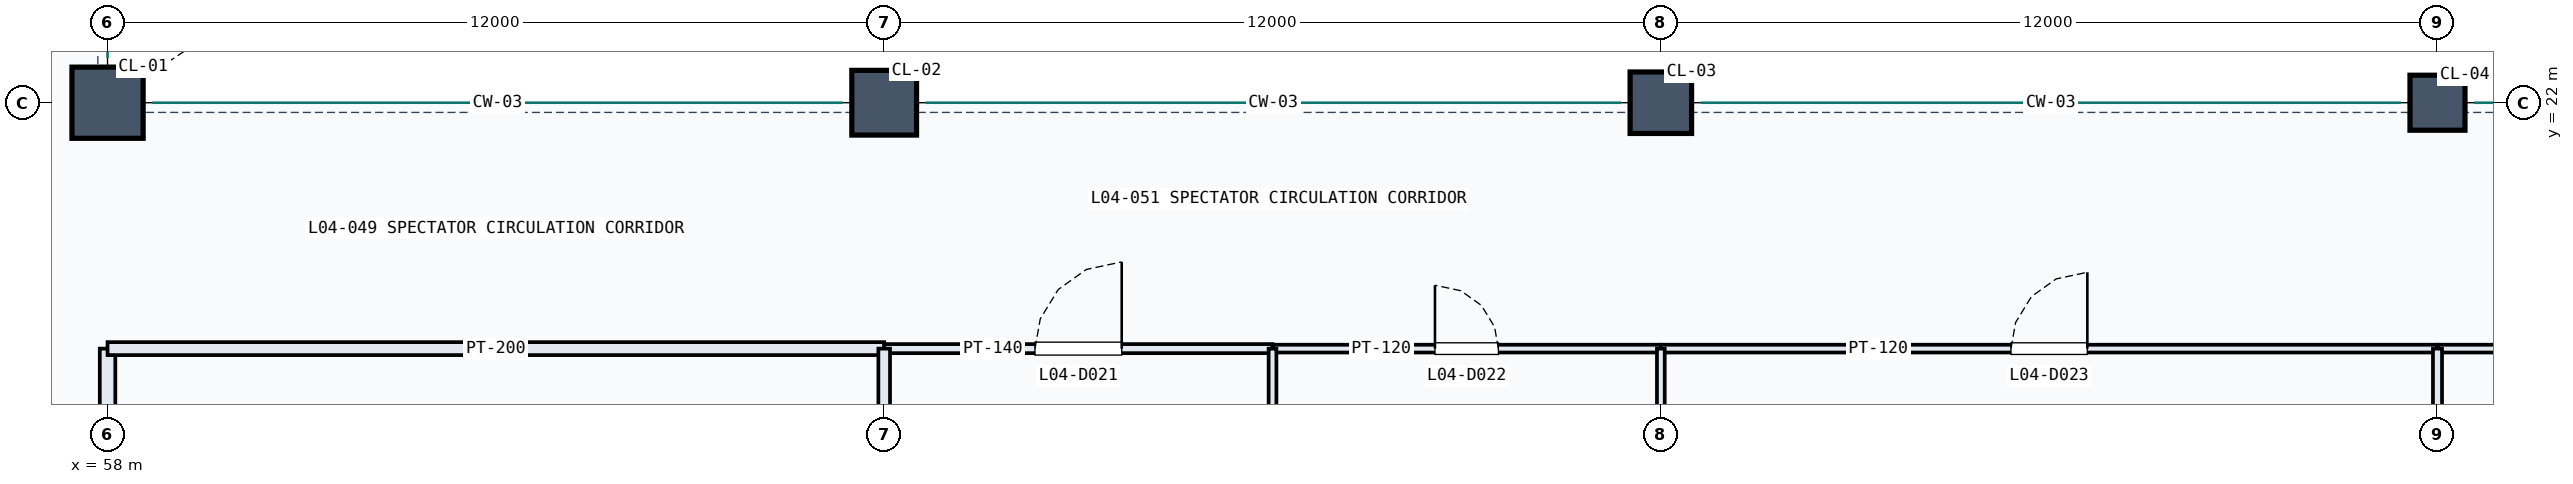
"""IFC4 building model, lengths in metres.
Left out: names, types, materials, properties, quantities, classifications, styles, units other than length and angle.
Written with IfcOpenShell. Run it as: python <this file> out.ifc"""

import sys

from ifc_helpers import new_model, si_unit, direction, frame, frame_2d, origin, origin_2d, place, context, subcontext, project, spatial, rectangle, extrude, element, fill, save


model = new_model("IFC4")
c1 = context("Model", 3, precision=1e-05, world=origin(), true_north=direction((0.0, 1.0)))
c2 = subcontext(c1, "Body", "Model", "MODEL_VIEW")
j1 = project(units=[si_unit("LENGTHUNIT", "METRE"), si_unit("PLANEANGLEUNIT", "RADIAN")], contexts=[c1])
p1 = place(None, origin())
s1 = spatial("IfcSite", under=j1, at=p1, CompositionType="ELEMENT")
p2 = place(p1, origin())
s2 = spatial("IfcBuilding", under=s1, at=p2, CompositionType="ELEMENT")
p3 = place(p2, frame((0.0, 0.0, 19.5)))
s3 = spatial("IfcBuildingStorey", under=s2, at=p3, CompositionType="ELEMENT", Elevation=19.5)
p4 = place(p3, frame((58.0, 22.0, 0.0), z_axis=(0.0, 0.0, 1.0), x_axis=(1.0, 0.0, 0.0)))
e1 = element("IfcColumn", 1, at=p4, inside=s3, PredefinedType="COLUMN", context=c2, shape_type="SweptSolid", body=[
    extrude(rectangle(XDim=1.1, YDim=1.1, at=origin_2d()), origin(), (0.0, 0.0, 1.0), 4.8),
])
p5 = place(p3, frame((70.0, 22.0, 0.0), z_axis=(0.0, 0.0, 1.0), x_axis=(1.0, 0.0, 0.0)))
e2 = element("IfcColumn", 2, at=p5, inside=s3, PredefinedType="COLUMN", context=c2, shape_type="SweptSolid", body=[
    extrude(rectangle(XDim=1.0, YDim=1.0, at=origin_2d()), origin(), (0.0, 0.0, 1.0), 4.8),
])
p6 = place(p3, frame((82.0, 22.0, 0.0), z_axis=(0.0, 0.0, 1.0), x_axis=(1.0, 0.0, 0.0)))
e3 = element("IfcColumn", 3, at=p6, inside=s3, PredefinedType="COLUMN", context=c2, shape_type="SweptSolid", body=[
    extrude(rectangle(XDim=0.95, YDim=0.95, at=origin_2d()), origin(), (0.0, 0.0, 1.0), 4.8),
])
p7 = place(p3, frame((94.0, 22.0, 0.0), z_axis=(0.0, 0.0, 1.0), x_axis=(1.0, 0.0, 0.0)))
e4 = element("IfcColumn", 4, at=p7, inside=s3, PredefinedType="COLUMN", context=c2, shape_type="SweptSolid", body=[
    extrude(rectangle(XDim=0.85, YDim=0.85, at=origin_2d()), origin(), (0.0, 0.0, 1.0), 4.8),
])
p8 = place(p3, frame((58.0, 11.22, 0.0), z_axis=(0.0, 0.0, 1.0), x_axis=(0.0, 1.0, 0.0)))
e5 = element("IfcWall", 5, at=p8, inside=s3, PredefinedType="PARTITIONING", context=c2, shape_type="SweptSolid", body=[
    extrude(rectangle(XDim=6.98, YDim=0.24, at=frame_2d((3.49, 0.0))), origin(), (0.0, 0.0, 1.0), 3.79),
])
p9 = place(p8, frame((2.78, 0.0, 0.0)))
e6 = element("IfcOpeningElement", 6, at=p9, cuts=e5, PredefinedType="OPENING", context=c2, shape_type="SweptSolid", body=[
    extrude(rectangle(XDim=1.42, YDim=2.25, at=frame_2d((0.71, 1.125))), frame((0.0, 0.13, 0.0), z_axis=(0.0, -1.0, 0.0), x_axis=(1.0, 0.0, 0.0)), (0.0, 0.0, 1.0), 0.26),
])
p10 = place(p3, frame((58.0, 18.2, 0.0), z_axis=(0.0, 0.0, 1.0), x_axis=(1.0, 0.0, 0.0)))
e7 = element("IfcWall", 7, at=p10, inside=s3, PredefinedType="PARTITIONING", context=c2, shape_type="SweptSolid", body=[
    extrude(rectangle(XDim=12.0, YDim=0.2, at=frame_2d((6.0, 0.0))), origin(), (0.0, 0.0, 1.0), 3.49),
])
p11 = place(p3, frame((70.0, 18.2, 0.0), z_axis=(0.0, 0.0, 1.0), x_axis=(1.0, 0.0, 0.0)))
e8 = element("IfcWall", 8, at=p11, inside=s3, PredefinedType="PARTITIONING", context=c2, shape_type="SweptSolid", body=[
    extrude(rectangle(XDim=6.0, YDim=0.14, at=frame_2d((3.0, 0.0))), origin(), (0.0, 0.0, 1.0), 3.49),
])
p12 = place(p11, frame((2.33, 0.0, 0.0)))
e9 = element("IfcOpeningElement", 9, at=p12, cuts=e8, PredefinedType="OPENING", context=c2, shape_type="SweptSolid", body=[
    extrude(rectangle(XDim=1.34, YDim=2.15, at=frame_2d((0.67, 1.075))), frame((0.0, 0.08, 0.0), z_axis=(0.0, -1.0, 0.0), x_axis=(1.0, 0.0, 0.0)), (0.0, 0.0, 1.0), 0.16),
])
p13 = place(p3, frame((76.0, 18.2, 0.0), z_axis=(0.0, 0.0, 1.0), x_axis=(1.0, 0.0, 0.0)))
e10 = element("IfcWall", 10, at=p13, inside=s3, PredefinedType="PARTITIONING", context=c2, shape_type="SweptSolid", body=[
    extrude(rectangle(XDim=6.0, YDim=0.12, at=frame_2d((3.0, 0.0))), origin(), (0.0, 0.0, 1.0), 3.64),
])
p14 = place(p13, frame((2.51, 0.0, 0.0)))
e11 = element("IfcOpeningElement", 11, at=p14, cuts=e10, PredefinedType="OPENING", context=c2, shape_type="SweptSolid", body=[
    extrude(rectangle(XDim=0.98, YDim=2.1, at=frame_2d((0.49, 1.05))), frame((0.0, 0.07, 0.0), z_axis=(0.0, -1.0, 0.0), x_axis=(1.0, 0.0, 0.0)), (0.0, 0.0, 1.0), 0.14),
])
p15 = place(p3, frame((82.0, 18.2, 0.0), z_axis=(0.0, 0.0, 1.0), x_axis=(1.0, 0.0, 0.0)))
e12 = element("IfcWall", 12, at=p15, inside=s3, PredefinedType="PARTITIONING", context=c2, shape_type="SweptSolid", body=[
    extrude(rectangle(XDim=12.0, YDim=0.12, at=frame_2d((6.0, 0.0))), origin(), (0.0, 0.0, 1.0), 3.64),
])
p16 = place(p15, frame((5.41, 0.0, 0.0)))
e13 = element("IfcOpeningElement", 13, at=p16, cuts=e12, PredefinedType="OPENING", context=c2, shape_type="SweptSolid", body=[
    extrude(rectangle(XDim=1.18, YDim=2.15, at=frame_2d((0.59, 1.075))), frame((0.0, 0.07, 0.0), z_axis=(0.0, -1.0, 0.0), x_axis=(1.0, 0.0, 0.0)), (0.0, 0.0, 1.0), 0.14),
])
p17 = place(p3, frame((94.0, 18.2, 0.0), z_axis=(0.0, 0.0, 1.0), x_axis=(1.0, 0.0, 0.0)))
e14 = element("IfcWall", 14, at=p17, inside=s3, PredefinedType="PARTITIONING", context=c2, shape_type="SweptSolid", body=[
    extrude(rectangle(XDim=10.0, YDim=0.12, at=frame_2d((5.0, 0.0))), origin(), (0.0, 0.0, 1.0), 3.707),
])
p18 = place(p17, frame((4.48, 0.0, 0.0)))
e15 = element("IfcOpeningElement", 15, at=p18, cuts=e14, PredefinedType="OPENING", context=c2, shape_type="SweptSolid", body=[
    extrude(rectangle(XDim=1.04, YDim=2.2, at=frame_2d((0.52, 1.1))), frame((0.0, 0.07, 0.0), z_axis=(0.0, -1.0, 0.0), x_axis=(1.0, 0.0, 0.0)), (0.0, 0.0, 1.0), 0.14),
])
p19 = place(p3, frame((70.0, 3.712, 0.0), z_axis=(0.0, 0.0, 1.0), x_axis=(0.0, 1.0, 0.0)))
e16 = element("IfcWall", 16, at=p19, inside=s3, PredefinedType="PARTITIONING", context=c2, shape_type="SweptSolid", body=[
    extrude(rectangle(XDim=14.488, YDim=0.18, at=frame_2d((7.244, 0.0))), origin(), (0.0, 0.0, 1.0), 3.49),
])
p20 = place(p3, frame((76.0, 2.415, 0.0), z_axis=(0.0, 0.0, 1.0), x_axis=(0.0, 1.0, 0.0)))
e17 = element("IfcWall", 17, at=p20, inside=s3, PredefinedType="PARTITIONING", context=c2, shape_type="SweptSolid", body=[
    extrude(rectangle(XDim=15.785, YDim=0.12, at=frame_2d((7.892, 0.0))), origin(), (0.0, 0.0, 1.0), 3.853),
])
p21 = place(p3, frame((82.0, 3.016, 0.0), z_axis=(0.0, 0.0, 1.0), x_axis=(0.0, 1.0, 0.0)))
e18 = element("IfcWall", 18, at=p21, inside=s3, PredefinedType="PARTITIONING", context=c2, shape_type="SweptSolid", body=[
    extrude(rectangle(XDim=15.184, YDim=0.12, at=frame_2d((7.592, 0.0))), origin(), (0.0, 0.0, 1.0), 3.64),
])
p22 = place(p3, frame((94.0, 4.185, 0.0), z_axis=(0.0, 0.0, 1.0), x_axis=(0.0, 1.0, 0.0)))
e19 = element("IfcWall", 19, at=p22, inside=s3, PredefinedType="PARTITIONING", context=c2, shape_type="SweptSolid", body=[
    extrude(rectangle(XDim=14.015, YDim=0.14, at=frame_2d((7.008, 0.0))), origin(), (0.0, 0.0, 1.0), 3.707),
])
p23 = place(p12, origin())
e20 = element("IfcDoor", 20, at=p23, inside=s3, OperationType="SINGLE_SWING_RIGHT", PredefinedType="DOOR", context=c2, shape_type="SweptSolid", body=[
    extrude(rectangle(XDim=1.34, YDim=2.15, at=frame_2d((0.67, 1.075))), frame((0.0, 0.025, 0.0), z_axis=(0.0, -1.0, 0.0), x_axis=(1.0, 0.0, 0.0)), (0.0, 0.0, 1.0), 0.05),
])
fill(e9, e20)
p24 = place(p14, origin())
e21 = element("IfcDoor", 21, at=p24, inside=s3, OperationType="SINGLE_SWING_LEFT", PredefinedType="DOOR", context=c2, shape_type="SweptSolid", body=[
    extrude(rectangle(XDim=0.98, YDim=2.1, at=frame_2d((0.49, 1.05))), frame((0.0, 0.025, 0.0), z_axis=(0.0, -1.0, 0.0), x_axis=(1.0, 0.0, 0.0)), (0.0, 0.0, 1.0), 0.05),
])
fill(e11, e21)
p25 = place(p16, origin())
e22 = element("IfcDoor", 22, at=p25, inside=s3, OperationType="SINGLE_SWING_RIGHT", PredefinedType="DOOR", context=c2, shape_type="SweptSolid", body=[
    extrude(rectangle(XDim=1.18, YDim=2.15, at=frame_2d((0.59, 1.075))), frame((0.0, 0.025, 0.0), z_axis=(0.0, -1.0, 0.0), x_axis=(1.0, 0.0, 0.0)), (0.0, 0.0, 1.0), 0.05),
])
fill(e13, e22)
save(model, sys.argv[1])
